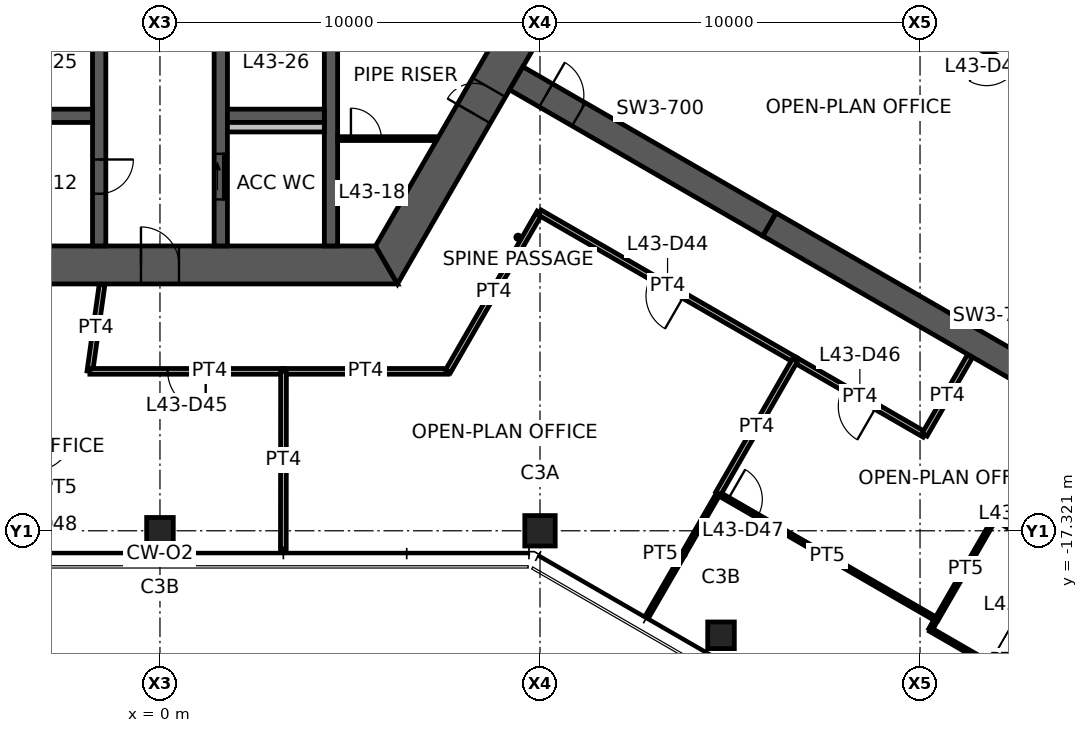
"""IFC4 building model, lengths in metres.
Left out: names, types, materials, properties, quantities, classifications, styles, units other than length and angle.
Written with IfcOpenShell. Run it as: python <this file> out.ifc"""

import sys

from ifc_helpers import new_model, si_unit, direction, frame, frame_2d, origin, origin_2d, place, context, subcontext, project, spatial, polyline, rectangle, hollow_rectangle, outline, extrude, element, fill, save


model = new_model("IFC4")
c1 = context("Model", 3, precision=1e-05, world=origin(), true_north=direction((0.0, 1.0)))
c2 = subcontext(c1, "Body", "Model", "MODEL_VIEW")
j1 = project(units=[si_unit("LENGTHUNIT", "METRE"), si_unit("PLANEANGLEUNIT", "RADIAN")], contexts=[c1])
p1 = place(None, origin())
s1 = spatial("IfcSite", under=j1, at=p1, CompositionType="ELEMENT")
p2 = place(p1, origin())
s2 = spatial("IfcBuilding", under=s1, at=p2, CompositionType="ELEMENT")
p3 = place(p2, frame((0.0, 0.0, 172.1)))
s3 = spatial("IfcBuildingStorey", under=s2, at=p3, CompositionType="ELEMENT", Elevation=172.1)
p4 = place(p3, frame((10.0, -17.321, 0.0), z_axis=(0.0, 0.0, 1.0), x_axis=(1.0, 0.0, 0.0)))
e1 = element("IfcColumn", 1, at=p4, inside=s3, PredefinedType="COLUMN", context=c2, shape_type="SweptSolid", body=[
    extrude(hollow_rectangle(XDim=0.8, YDim=0.8, WallThickness=0.045, at=origin_2d()), origin(), (0.0, 0.0, 1.0), 3.9),
])
for number, where, z_axis, x_axis in (
    (2, (0.0, -17.321, 0.0), (0.0, 0.0, 1.0), (1.0, 0.0, 0.0)),
    (3, (14.763, -20.071, 0.0), (0.0, 0.0, 1.0), (1.0, 0.0, 0.0)),
):
    element("IfcColumn", number, at=place(p3, frame(where, z_axis=z_axis, x_axis=x_axis)), inside=s3, PredefinedType="COLUMN", context=c2, shape_type="SweptSolid", body=[
        extrude(hollow_rectangle(XDim=0.7, YDim=0.7, WallThickness=0.036, at=origin_2d()), origin(), (0.0, 0.0, 1.0), 3.9),
    ])
p5 = place(p3, frame((-5.961, -10.325, 0.0), z_axis=(0.0, 0.0, 1.0), x_axis=(1.0, 0.0, 0.0)))
e4 = element("IfcWall", 4, at=p5, inside=s3, PredefinedType="SHEAR", context=c2, shape_type="SweptSolid", body=[
    extrude(outline(polyline([(-0.289, -0.5), (5.461, -0.5), (6.461, -0.5), (12.211, -0.5), (11.634, 0.5), (6.461, 0.5), (5.461, 0.5), (0.289, 0.5), (-0.289, -0.5)])), origin(), (0.0, 0.0, 1.0), 3.9),
])
p6 = place(p5, frame((5.461, 0.0, 0.0)))
e5 = element("IfcOpeningElement", 5, at=p6, cuts=e4, PredefinedType="OPENING", context=c2, shape_type="SweptSolid", body=[
    extrude(rectangle(XDim=1.0, YDim=2.1, at=frame_2d((0.5, 1.05))), frame((0.0, 0.51, 0.0), z_axis=(0.0, -1.0, 0.0), x_axis=(1.0, 0.0, 0.0)), (0.0, 0.0, 1.0), 1.02),
])
p7 = place(p3, frame((5.961, -10.325, 0.0), z_axis=(0.0, 0.0, 1.0), x_axis=(0.500004296715, 0.866022923061, 0.0)))
e6 = element("IfcWall", 6, at=p7, inside=s3, PredefinedType="SHEAR", context=c2, shape_type="SweptSolid", body=[
    extrude(outline(polyline([(-0.289, -0.5), (4.594, -0.5), (5.394, -0.5), (12.211, -0.5), (11.634, 0.5), (5.394, 0.5), (4.594, 0.5), (0.289, 0.5), (-0.289, -0.5)])), origin(), (0.0, 0.0, 1.0), 3.9),
])
p8 = place(p7, frame((4.594, 0.0, 0.0)))
e7 = element("IfcOpeningElement", 7, at=p8, cuts=e6, PredefinedType="OPENING", context=c2, shape_type="SweptSolid", body=[
    extrude(rectangle(XDim=0.8, YDim=2.1, at=frame_2d((0.4, 1.05))), frame((0.0, 0.51, 0.0), z_axis=(0.0, -1.0, 0.0), x_axis=(1.0, 0.0, 0.0)), (0.0, 0.0, 1.0), 1.02),
])
p9 = place(p3, frame((9.375, -5.413, 0.0), z_axis=(0.0, 0.0, 1.0), x_axis=(0.866032377459, -0.499987921047, 0.0)))
e8 = element("IfcWall", 8, at=p9, inside=s3, PredefinedType="SHEAR", context=c2, shape_type="SweptSolid", body=[
    extrude(rectangle(XDim=7.696, YDim=0.7, at=frame_2d((3.848, 0.0))), origin(), (0.0, 0.0, 1.0), 3.9),
])
p10 = place(p9, frame((0.9, 0.0, 0.0)))
e9 = element("IfcOpeningElement", 9, at=p10, cuts=e8, PredefinedType="OPENING", context=c2, shape_type="SweptSolid", body=[
    extrude(rectangle(XDim=1.0, YDim=2.1, at=frame_2d((0.5, 1.05))), frame((0.0, 0.36, 0.0), z_axis=(0.0, -1.0, 0.0), x_axis=(1.0, 0.0, 0.0)), (0.0, 0.0, 1.0), 0.72),
])
p11 = place(p3, frame((16.039, -9.26, 0.0), z_axis=(0.0, 0.0, 1.0), x_axis=(0.866024837091, -0.50000098154, 0.0)))
e10 = element("IfcWall", 10, at=p11, inside=s3, PredefinedType="SHEAR", context=c2, shape_type="SweptSolid", body=[
    extrude(rectangle(XDim=13.0, YDim=0.7, at=frame_2d((6.5, 0.0))), origin(), (0.0, 0.0, 1.0), 3.9),
])
p12 = place(p3, frame((-1.6, -3.775, 0.0), z_axis=(0.0, 0.0, 1.0), x_axis=(0.0, -1.0, 0.0)))
e11 = element("IfcWall", 11, at=p12, inside=s3, PredefinedType="SHEAR", context=c2, shape_type="SweptSolid", body=[
    extrude(rectangle(XDim=6.05, YDim=0.35, at=frame_2d((3.025, 0.0))), origin(), (0.0, 0.0, 1.0), 3.9),
])
p13 = place(p12, frame((3.775, 0.0, 0.0)))
e12 = element("IfcOpeningElement", 12, at=p13, cuts=e11, PredefinedType="OPENING", context=c2, shape_type="SweptSolid", body=[
    extrude(rectangle(XDim=0.9, YDim=2.1, at=frame_2d((0.45, 1.05))), frame((0.0, 0.185, 0.0), z_axis=(0.0, -1.0, 0.0), x_axis=(1.0, 0.0, 0.0)), (0.0, 0.0, 1.0), 0.37),
])
p14 = place(p3, frame((1.6, -3.775, 0.0), z_axis=(0.0, 0.0, 1.0), x_axis=(0.0, -1.0, 0.0)))
e13 = element("IfcWall", 13, at=p14, inside=s3, PredefinedType="SHEAR", context=c2, shape_type="SweptSolid", body=[
    extrude(rectangle(XDim=6.05, YDim=0.35, at=frame_2d((3.025, 0.0))), origin(), (0.0, 0.0, 1.0), 3.9),
])
p15 = place(p14, frame((3.625, 0.0, 0.0)))
e14 = element("IfcOpeningElement", 14, at=p15, cuts=e13, PredefinedType="OPENING", context=c2, shape_type="SweptSolid", body=[
    extrude(rectangle(XDim=1.2, YDim=2.1, at=frame_2d((0.6, 1.05))), frame((0.0, 0.185, 0.0), z_axis=(0.0, -1.0, 0.0), x_axis=(1.0, 0.0, 0.0)), (0.0, 0.0, 1.0), 0.37),
])
p16 = place(p3, frame((4.5, -3.775, 0.0), z_axis=(0.0, 0.0, 1.0), x_axis=(0.0, -1.0, 0.0)))
e15 = element("IfcWall", 15, at=p16, inside=s3, PredefinedType="SHEAR", context=c2, shape_type="SweptSolid", body=[
    extrude(rectangle(XDim=6.05, YDim=0.35, at=frame_2d((3.025, 0.0))), origin(), (0.0, 0.0, 1.0), 3.9),
])
for number, where, z_axis, x_axis in (
    (16, (-4.325, -6.4, 0.0), (0.0, 0.0, 1.0), (1.0, 0.0, 0.0)),
    (17, (1.775, -6.4, 0.0), (0.0, 0.0, 1.0), (1.0, 0.0, 0.0)),
):
    element("IfcWall", number, at=place(p3, frame(where, z_axis=z_axis, x_axis=x_axis)), inside=s3, PredefinedType="SHEAR", context=c2, shape_type="SweptSolid", body=[
        extrude(rectangle(XDim=2.55, YDim=0.35, at=frame_2d((1.275, 0.0))), origin(), (0.0, 0.0, 1.0), 3.9),
    ])
p17 = place(p3, frame((1.775, -6.7, 0.0), z_axis=(0.0, 0.0, 1.0), x_axis=(1.0, 0.0, 0.0)))
e18 = element("IfcWall", 18, at=p17, inside=s3, PredefinedType="PLUMBINGWALL", context=c2, shape_type="SweptSolid", body=[
    extrude(rectangle(XDim=2.55, YDim=0.25, at=frame_2d((1.275, 0.0))), origin(), (0.0, 0.0, 1.0), 3.9),
])
p18 = place(p3, frame((4.675, -7.0, 0.0), z_axis=(0.0, 0.0, 1.0), x_axis=(1.0, 0.0, 0.0)))
e19 = element("IfcWall", 19, at=p18, inside=s3, PredefinedType="PARTITIONING", context=c2, shape_type="SweptSolid", body=[
    extrude(outline(polyline([(0.0, -0.05), (0.35, -0.05), (1.15, -0.05), (2.6, -0.05), (2.628, 0.0), (2.634, 0.05), (1.15, 0.05), (0.35, 0.05), (0.0, 0.05), (0.0, -0.05)])), origin(), (0.0, 0.0, 1.0), 2.95),
])
p19 = place(p18, frame((0.35, 0.0, 0.0)))
e20 = element("IfcOpeningElement", 20, at=p19, cuts=e19, PredefinedType="OPENING", context=c2, shape_type="SweptSolid", body=[
    extrude(rectangle(XDim=0.8, YDim=2.1, at=frame_2d((0.4, 1.05))), frame((0.0, 0.06, 0.0), z_axis=(0.0, -1.0, 0.0), x_axis=(1.0, 0.0, 0.0)), (0.0, 0.0, 1.0), 0.12),
])
p20 = place(p3, frame((27.227, -7.863, 0.0), z_axis=(0.0, 0.0, 1.0), x_axis=(-0.866343956507, 0.499447844147, 0.0)))
e21 = element("IfcWall", 21, at=p20, inside=s3, PredefinedType="PARTITIONING", context=c2, shape_type="SweptSolid", body=[
    extrude(rectangle(XDim=6.62, YDim=0.1, at=frame_2d((3.31, 0.0))), origin(), (0.0, 0.0, 1.0), 2.95),
])
p21 = place(p20, frame((5.42, 0.0, 0.0)))
e22 = element("IfcOpeningElement", 22, at=p21, cuts=e21, PredefinedType="OPENING", context=c2, shape_type="SweptSolid", body=[
    extrude(rectangle(XDim=0.9, YDim=2.1, at=frame_2d((0.45, 1.05))), frame((0.0, 0.06, 0.0), z_axis=(0.0, -1.0, 0.0), x_axis=(1.0, 0.0, 0.0)), (0.0, 0.0, 1.0), 0.12),
])
p22 = place(p3, frame((7.578, -13.125, 0.0), z_axis=(0.0, 0.0, 1.0), x_axis=(-1.0, 0.0, 0.0)))
e23 = element("IfcWall", 23, at=p22, inside=s3, PredefinedType="PARTITIONING", context=c2, shape_type="SweptSolid", body=[
    extrude(rectangle(XDim=4.336, YDim=0.15, at=frame_2d((2.168, 0.0))), origin(), (0.0, 0.0, 1.0), 2.95),
])
p23 = place(p3, frame((9.992, -8.944, 0.0), z_axis=(0.0, 0.0, 1.0), x_axis=(-0.500033248206, -0.866006207073, 0.0)))
e24 = element("IfcWall", 24, at=p23, inside=s3, PredefinedType="PARTITIONING", context=c2, shape_type="SweptSolid", body=[
    extrude(rectangle(XDim=4.828, YDim=0.15, at=frame_2d((2.414, 0.0))), origin(), (0.0, 0.0, 1.0), 2.95),
])
p24 = place(p3, frame((16.721, -12.83, 0.0), z_axis=(0.0, 0.0, 1.0), x_axis=(-0.866020780657, 0.500008007406, 0.0)))
e25 = element("IfcWall", 25, at=p24, inside=s3, PredefinedType="PARTITIONING", context=c2, shape_type="SweptSolid", body=[
    extrude(rectangle(XDim=7.771, YDim=0.15, at=frame_2d((3.885, 0.0))), origin(), (0.0, 0.0, 1.0), 2.95),
])
p25 = place(p24, frame((3.385, 0.0, 0.0)))
e26 = element("IfcOpeningElement", 26, at=p25, cuts=e25, PredefinedType="OPENING", context=c2, shape_type="SweptSolid", body=[
    extrude(rectangle(XDim=1.0, YDim=2.1, at=frame_2d((0.5, 1.05))), frame((0.0, 0.085, 0.0), z_axis=(0.0, -1.0, 0.0), x_axis=(1.0, 0.0, 0.0)), (0.0, 0.0, 1.0), 0.17),
])
p26 = place(p3, frame((-1.844, -13.125, 0.0), z_axis=(0.0, 0.0, 1.0), x_axis=(0.139119980631, 0.990275532864, 0.0)))
e27 = element("IfcWall", 27, at=p26, inside=s3, PredefinedType="PARTITIONING", context=c2, shape_type="SweptSolid", body=[
    extrude(rectangle(XDim=2.302, YDim=0.15, at=frame_2d((1.151, 0.0))), origin(), (0.0, 0.0, 1.0), 2.95),
])
p27 = place(p3, frame((3.251, -13.125, 0.0), z_axis=(0.0, 0.0, 1.0), x_axis=(-1.0, 0.0, 0.0)))
e28 = element("IfcWall", 28, at=p27, inside=s3, PredefinedType="PARTITIONING", context=c2, shape_type="SweptSolid", body=[
    extrude(rectangle(XDim=5.096, YDim=0.15, at=frame_2d((2.548, 0.0))), origin(), (0.0, 0.0, 1.0), 2.95),
])
p28 = place(p27, frame((2.048, 0.0, 0.0)))
e29 = element("IfcOpeningElement", 29, at=p28, cuts=e28, PredefinedType="OPENING", context=c2, shape_type="SweptSolid", body=[
    extrude(rectangle(XDim=1.0, YDim=2.1, at=frame_2d((0.5, 1.05))), frame((0.0, 0.085, 0.0), z_axis=(0.0, -1.0, 0.0), x_axis=(1.0, 0.0, 0.0)), (0.0, 0.0, 1.0), 0.17),
])
p29 = place(p3, frame((20.12, -14.792, 0.0), z_axis=(0.0, 0.0, 1.0), x_axis=(-0.866038848349, 0.499976712608, 0.0)))
e30 = element("IfcWall", 30, at=p29, inside=s3, PredefinedType="PARTITIONING", context=c2, shape_type="SweptSolid", body=[
    extrude(rectangle(XDim=3.934, YDim=0.15, at=frame_2d((1.967, 0.0))), origin(), (0.0, 0.0, 1.0), 2.95),
])
p30 = place(p29, frame((1.467, 0.0, 0.0)))
e31 = element("IfcOpeningElement", 31, at=p30, cuts=e30, PredefinedType="OPENING", context=c2, shape_type="SweptSolid", body=[
    extrude(rectangle(XDim=1.0, YDim=2.1, at=frame_2d((0.5, 1.05))), frame((0.0, 0.085, 0.0), z_axis=(0.0, -1.0, 0.0), x_axis=(1.0, 0.0, 0.0)), (0.0, 0.0, 1.0), 0.17),
])
p31 = place(p3, frame((21.31, -12.731, 0.0), z_axis=(0.0, 0.0, 1.0), x_axis=(-0.500077627542, -0.865980580863, 0.0)))
e32 = element("IfcWall", 32, at=p31, inside=s3, PredefinedType="PARTITIONING", context=c2, shape_type="SweptSolid", body=[
    extrude(rectangle(XDim=2.38, YDim=0.15, at=frame_2d((1.19, 0.0))), origin(), (0.0, 0.0, 1.0), 2.95),
])
p32 = place(p3, frame((20.275, -19.924, 0.0), z_axis=(0.0, 0.0, 1.0), x_axis=(0.86598972202, -0.500061797536, 0.0)))
e33 = element("IfcWall", 33, at=p32, inside=s3, PredefinedType="PARTITIONING", context=c2, shape_type="SweptSolid", body=[
    extrude(rectangle(XDim=3.28, YDim=0.1, at=frame_2d((1.64, 0.0))), origin(), (0.0, 0.0, 1.0), 2.95),
])
p33 = place(p3, frame((20.43, -19.646, 0.0), z_axis=(0.0, 0.0, 1.0), x_axis=(-0.486425680342, -0.873721956634, 0.0)))
e34 = element("IfcWall", 34, at=p33, inside=s3, PredefinedType="PARTITIONING", context=c2, shape_type="SweptSolid", body=[
    extrude(rectangle(XDim=0.318, YDim=0.1, at=frame_2d((0.159, 0.0))), origin(), (0.0, 0.0, 1.0), 2.95),
])
p34 = place(p3, frame((12.84, -19.543, 0.0), z_axis=(0.0, 0.0, 1.0), x_axis=(0.50111938689, 0.865378160161, 0.0)))
e35 = element("IfcWall", 35, at=p34, inside=s3, PredefinedType="PARTITIONING", context=c2, shape_type="SweptSolid", body=[
    extrude(rectangle(XDim=3.705, YDim=0.1, at=frame_2d((1.853, 0.0))), origin(), (0.0, 0.0, 1.0), 2.95),
])
p35 = place(p3, frame((14.69, -16.338, 0.0), z_axis=(0.0, 0.0, 1.0), x_axis=(0.866056800938, -0.499945614591, 0.0)))
e36 = element("IfcWall", 36, at=p35, inside=s3, PredefinedType="PARTITIONING", context=c2, shape_type="SweptSolid", body=[
    extrude(rectangle(XDim=6.629, YDim=0.1, at=frame_2d((3.314, 0.0))), origin(), (0.0, 0.0, 1.0), 2.95),
])
p36 = place(p35, frame((0.3, 0.0, 0.0)))
e37 = element("IfcOpeningElement", 37, at=p36, cuts=e36, PredefinedType="OPENING", context=c2, shape_type="SweptSolid", body=[
    extrude(rectangle(XDim=0.9, YDim=2.1, at=frame_2d((0.45, 1.05))), frame((0.0, 0.06, 0.0), z_axis=(0.0, -1.0, 0.0), x_axis=(1.0, 0.0, 0.0)), (0.0, 0.0, 1.0), 0.12),
])
p37 = place(p3, frame((20.431, -19.653, 0.0), z_axis=(0.0, 0.0, 1.0), x_axis=(0.500029867204, 0.86600815926, 0.0)))
e38 = element("IfcWall", 38, at=p37, inside=s3, PredefinedType="PARTITIONING", context=c2, shape_type="SweptSolid", body=[
    extrude(rectangle(XDim=3.071, YDim=0.1, at=frame_2d((1.535, 0.0))), origin(), (0.0, 0.0, 1.0), 2.95),
])
p38 = place(p3, frame((21.967, -16.993, 0.0), z_axis=(0.0, 0.0, 1.0), x_axis=(0.866020751647, -0.500008057651, 0.0)))
e39 = element("IfcWall", 39, at=p38, inside=s3, PredefinedType="PARTITIONING", context=c2, shape_type="SweptSolid", body=[
    extrude(rectangle(XDim=3.305, YDim=0.1, at=frame_2d((1.653, 0.0))), origin(), (0.0, 0.0, 1.0), 2.95),
])
p39 = place(p38, frame((0.3, 0.0, 0.0)))
e40 = element("IfcOpeningElement", 40, at=p39, cuts=e39, PredefinedType="OPENING", context=c2, shape_type="SweptSolid", body=[
    extrude(rectangle(XDim=0.9, YDim=2.1, at=frame_2d((0.45, 1.05))), frame((0.0, 0.06, 0.0), z_axis=(0.0, -1.0, 0.0), x_axis=(1.0, 0.0, 0.0)), (0.0, 0.0, 1.0), 0.12),
])
p40 = place(p3, frame((3.246, -17.801, 0.0), z_axis=(0.0, 0.0, 1.0), x_axis=(0.001096662352, 0.999999398666, 0.0)))
e41 = element("IfcWall", 41, at=p40, inside=s3, PredefinedType="PARTITIONING", context=c2, shape_type="SweptSolid", body=[
    extrude(rectangle(XDim=4.675, YDim=0.15, at=frame_2d((2.337, 0.0))), origin(), (0.0, 0.0, 1.0), 2.95),
])
p41 = place(p3, frame((16.713, -12.825, 0.0), z_axis=(0.0, 0.0, 1.0), x_axis=(-0.498976779382, -0.866615355067, 0.0)))
e42 = element("IfcWall", 42, at=p41, inside=s3, PredefinedType="PARTITIONING", context=c2, shape_type="SweptSolid", body=[
    extrude(rectangle(XDim=4.054, YDim=0.15, at=frame_2d((2.027, 0.0))), origin(), (0.0, 0.0, 1.0), 2.95),
])
p42 = place(p6, origin())
e43 = element("IfcDoor", 43, at=p42, inside=s3, OperationType="SINGLE_SWING_LEFT", PredefinedType="DOOR", context=c2, shape_type="SweptSolid", body=[
    extrude(rectangle(XDim=1.0, YDim=2.1, at=frame_2d((0.5, 1.05))), frame((0.0, 0.025, 0.0), z_axis=(0.0, -1.0, 0.0), x_axis=(1.0, 0.0, 0.0)), (0.0, 0.0, 1.0), 0.05),
])
fill(e5, e43)
p43 = place(p8, origin())
e44 = element("IfcDoor", 44, at=p43, inside=s3, OperationType="SINGLE_SWING_LEFT", PredefinedType="DOOR", context=c2, shape_type="SweptSolid", body=[
    extrude(rectangle(XDim=0.8, YDim=2.1, at=frame_2d((0.4, 1.05))), frame((0.0, 0.025, 0.0), z_axis=(0.0, -1.0, 0.0), x_axis=(1.0, 0.0, 0.0)), (0.0, 0.0, 1.0), 0.05),
])
fill(e7, e44)
p44 = place(p15, origin())
e45 = element("IfcDoor", 45, at=p44, inside=s3, OperationType="SLIDING_TO_LEFT", PredefinedType="DOOR", context=c2, shape_type="SweptSolid", body=[
    extrude(rectangle(XDim=1.2, YDim=2.1, at=frame_2d((0.6, 1.05))), frame((0.0, 0.025, 0.0), z_axis=(0.0, -1.0, 0.0), x_axis=(1.0, 0.0, 0.0)), (0.0, 0.0, 1.0), 0.05),
])
fill(e14, e45)
p45 = place(p13, origin())
e46 = element("IfcDoor", 46, at=p45, inside=s3, OperationType="SINGLE_SWING_LEFT", PredefinedType="DOOR", context=c2, shape_type="SweptSolid", body=[
    extrude(rectangle(XDim=0.9, YDim=2.1, at=frame_2d((0.45, 1.05))), frame((0.0, 0.025, 0.0), z_axis=(0.0, -1.0, 0.0), x_axis=(1.0, 0.0, 0.0)), (0.0, 0.0, 1.0), 0.05),
])
fill(e12, e46)
p46 = place(p10, origin())
e47 = element("IfcDoor", 47, at=p46, inside=s3, OperationType="SINGLE_SWING_LEFT", PredefinedType="DOOR", context=c2, shape_type="SweptSolid", body=[
    extrude(rectangle(XDim=1.0, YDim=2.1, at=frame_2d((0.5, 1.05))), frame((0.0, 0.025, 0.0), z_axis=(0.0, -1.0, 0.0), x_axis=(1.0, 0.0, 0.0)), (0.0, 0.0, 1.0), 0.05),
])
fill(e9, e47)
p47 = place(p19, origin())
e48 = element("IfcDoor", 48, at=p47, inside=s3, OperationType="SINGLE_SWING_LEFT", PredefinedType="DOOR", context=c2, shape_type="SweptSolid", body=[
    extrude(rectangle(XDim=0.8, YDim=2.1, at=frame_2d((0.4, 1.05))), frame((0.0, 0.025, 0.0), z_axis=(0.0, -1.0, 0.0), x_axis=(1.0, 0.0, 0.0)), (0.0, 0.0, 1.0), 0.05),
])
fill(e20, e48)
p48 = place(p21, origin())
e49 = element("IfcDoor", 49, at=p48, inside=s3, OperationType="SINGLE_SWING_RIGHT", PredefinedType="DOOR", context=c2, shape_type="SweptSolid", body=[
    extrude(rectangle(XDim=0.9, YDim=2.1, at=frame_2d((0.45, 1.05))), frame((0.0, 0.025, 0.0), z_axis=(0.0, -1.0, 0.0), x_axis=(1.0, 0.0, 0.0)), (0.0, 0.0, 1.0), 0.05),
])
fill(e22, e49)
p49 = place(p25, origin())
e50 = element("IfcDoor", 50, at=p49, inside=s3, OperationType="SINGLE_SWING_LEFT", PredefinedType="DOOR", context=c2, shape_type="SweptSolid", body=[
    extrude(rectangle(XDim=1.0, YDim=2.1, at=frame_2d((0.5, 1.05))), frame((0.0, 0.025, 0.0), z_axis=(0.0, -1.0, 0.0), x_axis=(1.0, 0.0, 0.0)), (0.0, 0.0, 1.0), 0.05),
])
fill(e26, e50)
p50 = place(p28, origin())
e51 = element("IfcDoor", 51, at=p50, inside=s3, OperationType="SINGLE_SWING_LEFT", PredefinedType="DOOR", context=c2, shape_type="SweptSolid", body=[
    extrude(rectangle(XDim=1.0, YDim=2.1, at=frame_2d((0.5, 1.05))), frame((0.0, 0.025, 0.0), z_axis=(0.0, -1.0, 0.0), x_axis=(1.0, 0.0, 0.0)), (0.0, 0.0, 1.0), 0.05),
])
fill(e29, e51)
p51 = place(p30, origin())
e52 = element("IfcDoor", 52, at=p51, inside=s3, OperationType="SINGLE_SWING_LEFT", PredefinedType="DOOR", context=c2, shape_type="SweptSolid", body=[
    extrude(rectangle(XDim=1.0, YDim=2.1, at=frame_2d((0.5, 1.05))), frame((0.0, 0.025, 0.0), z_axis=(0.0, -1.0, 0.0), x_axis=(1.0, 0.0, 0.0)), (0.0, 0.0, 1.0), 0.05),
])
fill(e31, e52)
p52 = place(p36, origin())
e53 = element("IfcDoor", 53, at=p52, inside=s3, OperationType="SINGLE_SWING_LEFT", PredefinedType="DOOR", context=c2, shape_type="SweptSolid", body=[
    extrude(rectangle(XDim=0.9, YDim=2.1, at=frame_2d((0.45, 1.05))), frame((0.0, 0.025, 0.0), z_axis=(0.0, -1.0, 0.0), x_axis=(1.0, 0.0, 0.0)), (0.0, 0.0, 1.0), 0.05),
])
fill(e37, e53)
p53 = place(p39, origin())
e54 = element("IfcDoor", 54, at=p53, inside=s3, OperationType="SINGLE_SWING_LEFT", PredefinedType="DOOR", context=c2, shape_type="SweptSolid", body=[
    extrude(rectangle(XDim=0.9, YDim=2.1, at=frame_2d((0.45, 1.05))), frame((0.0, 0.025, 0.0), z_axis=(0.0, -1.0, 0.0), x_axis=(1.0, 0.0, 0.0)), (0.0, 0.0, 1.0), 0.05),
])
fill(e40, e54)
save(model, sys.argv[1])
